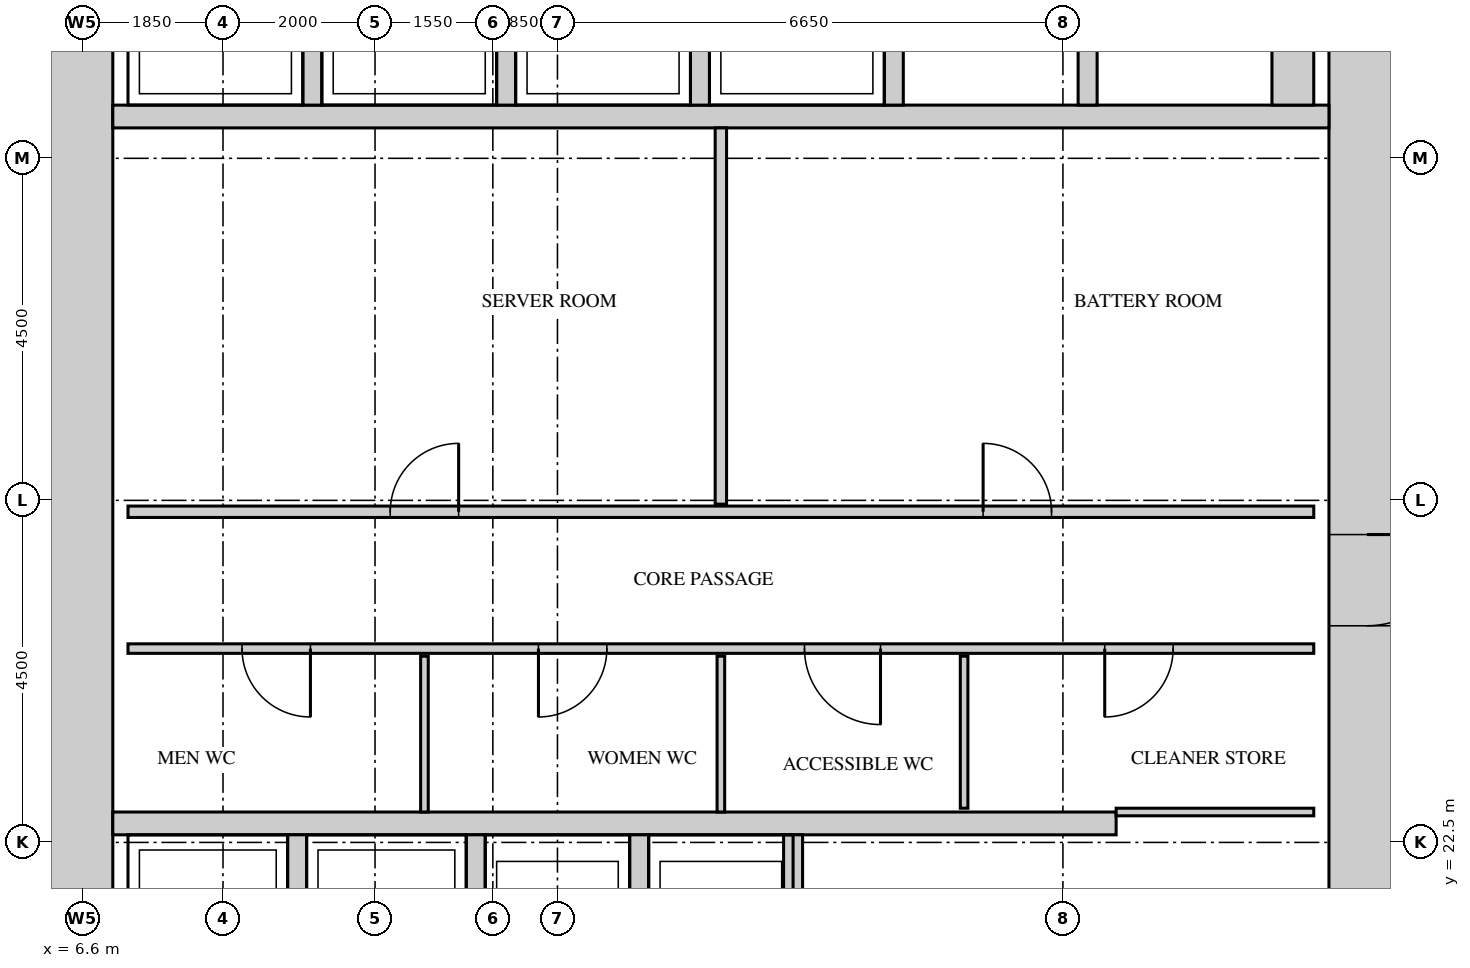
"""IFC4 building model, lengths in metres.
Left out: names, types, materials, properties, quantities, classifications, styles, units other than length and angle.
Written with IfcOpenShell. Run it as: python <this file> out.ifc"""

import sys

from ifc_helpers import new_model, si_unit, direction, frame, frame_2d, origin, place, context, subcontext, project, spatial, rectangle, extrude, source, transform, mapped, element, fill, save


model = new_model("IFC4")
c1 = context("Model", 3, precision=1e-05, world=origin(), true_north=direction((0.0, 1.0)))
c2 = subcontext(c1, "Body", "Model", "MODEL_VIEW")
j1 = project(units=[si_unit("LENGTHUNIT", "METRE"), si_unit("PLANEANGLEUNIT", "RADIAN")], contexts=[c1])
p1 = place(None, origin())
s1 = spatial("IfcSite", under=j1, at=p1, CompositionType="ELEMENT")
p2 = place(p1, origin())
s2 = spatial("IfcBuilding", under=s1, at=p2, CompositionType="ELEMENT")
p3 = place(p2, frame((0.0, 0.0, 141.1)))
s3 = spatial("IfcBuildingStorey", under=s2, at=p3, CompositionType="ELEMENT", Elevation=141.1)
m1 = source(origin(), c2, "Body", "SweptSolid", [
    extrude(rectangle(XDim=28.0, YDim=1.0, at=frame_2d((14.0, 0.0))), origin(), (0.0, 0.0, 1.0), 4.1),
])
p4 = place(p3, frame((23.5, 13.0, 0.0), z_axis=(0.0, 0.0, 1.0), x_axis=(0.0, 1.0, 0.0)))
e1 = element("IfcWall", 1, at=p4, inside=s3, PredefinedType="SHEAR", context=c2, shape_type="MappedRepresentation", body=[
    mapped(m1, transform((0.0, 0.0, 0.0))),
])
m2 = source(origin(), c2, "Body", "SweptSolid", [
    extrude(rectangle(XDim=1.8, YDim=2.1, at=frame_2d((0.9, 1.05))), frame((0.0, 0.51, 0.0), z_axis=(0.0, -1.0, 0.0), x_axis=(1.0, 0.0, 0.0)), (0.0, 0.0, 1.0), 1.02),
])
p5 = place(p4, frame((22.6, 0.0, 0.0)))
e2 = element("IfcOpeningElement", 2, at=p5, cuts=e1, PredefinedType="OPENING", context=c2, shape_type="MappedRepresentation", body=[
    mapped(m2, transform((0.0, 0.0, 0.0))),
])
m3 = source(origin(), c2, "Body", "SweptSolid", [
    extrude(rectangle(XDim=1.2, YDim=2.1, at=frame_2d((0.6, 1.05))), frame((0.0, 0.51, 0.0), z_axis=(0.0, -1.0, 0.0), x_axis=(1.0, 0.0, 0.0)), (0.0, 0.0, 1.0), 1.02),
])
p6 = place(p4, frame((12.35, 0.0, 0.0)))
e3 = element("IfcOpeningElement", 3, at=p6, cuts=e1, PredefinedType="OPENING", context=c2, shape_type="MappedRepresentation", body=[
    mapped(m3, transform((0.0, 0.0, 0.0))),
])
m4 = source(origin(), c2, "Body", "SweptSolid", [
    extrude(rectangle(XDim=0.9, YDim=2.1, at=frame_2d((0.45, 1.05))), frame((0.0, 0.51, 0.0), z_axis=(0.0, -1.0, 0.0), x_axis=(1.0, 0.0, 0.0)), (0.0, 0.0, 1.0), 1.02),
])
p7 = place(p4, frame((4.6, 0.0, 0.0)))
e4 = element("IfcOpeningElement", 4, at=p7, cuts=e1, PredefinedType="OPENING", context=c2, shape_type="MappedRepresentation", body=[
    mapped(m4, transform((0.0, 0.0, 0.0))),
])
p8 = place(p3, frame((6.5, 13.0, 0.0), z_axis=(0.0, 0.0, 1.0), x_axis=(0.0, 1.0, 0.0)))
e5 = element("IfcWall", 5, at=p8, inside=s3, PredefinedType="SHEAR", context=c2, shape_type="MappedRepresentation", body=[
    mapped(m1, transform((0.0, 0.0, 0.0))),
])
m5 = source(origin(), c2, "Body", "SweptSolid", [
    extrude(rectangle(XDim=13.2, YDim=0.3, at=frame_2d((6.6, 0.0))), origin(), (0.0, 0.0, 1.0), 4.1),
])
p9 = place(p3, frame((7.0, 22.75, 0.0), z_axis=(0.0, 0.0, 1.0), x_axis=(1.0, 0.0, 0.0)))
e6 = element("IfcWall", 6, at=p9, inside=s3, PredefinedType="STANDARD", context=c2, shape_type="MappedRepresentation", body=[
    mapped(m5, transform((0.0, 0.0, 0.0))),
])
m6 = source(origin(), c2, "Body", "SweptSolid", [
    extrude(rectangle(XDim=16.0, YDim=0.3, at=frame_2d((8.0, 0.0))), origin(), (0.0, 0.0, 1.0), 4.1),
])
p10 = place(p3, frame((7.0, 32.05, 0.0), z_axis=(0.0, 0.0, 1.0), x_axis=(1.0, 0.0, 0.0)))
e7 = element("IfcWall", 7, at=p10, inside=s3, PredefinedType="STANDARD", context=c2, shape_type="MappedRepresentation", body=[
    mapped(m6, transform((0.0, 0.0, 0.0))),
])
m7 = source(origin(), c2, "Body", "SweptSolid", [
    extrude(rectangle(XDim=3.1, YDim=0.25, at=frame_2d((1.55, 0.0))), origin(), (0.0, 0.0, 1.0), 4.1),
])
for number, where, z_axis, x_axis in (
    (8, (9.425, 19.5, 0.0), (0.0, 0.0, 1.0), (0.0, 1.0, 0.0)),
    (9, (11.775, 19.5, 0.0), (0.0, 0.0, 1.0), (0.0, 1.0, 0.0)),
    (10, (13.925, 19.5, 0.0), (0.0, 0.0, 1.0), (0.0, 1.0, 0.0)),
    (11, (15.95, 19.5, 0.0), (0.0, 0.0, 1.0), (0.0, 1.0, 0.0)),
):
    element("IfcWall", number, at=place(p3, frame(where, z_axis=z_axis, x_axis=x_axis)), inside=s3, PredefinedType="STANDARD", context=c2, shape_type="MappedRepresentation", body=[
        mapped(m7, transform((0.0, 0.0, 0.0))),
    ])
m8 = source(origin(), c2, "Body", "SweptSolid", [
    extrude(rectangle(XDim=2.4, YDim=0.25, at=frame_2d((1.2, 0.0))), origin(), (0.0, 0.0, 1.0), 4.1),
])
for number, where, z_axis, x_axis in (
    (12, (9.625, 32.2, 0.0), (0.0, 0.0, 1.0), (0.0, 1.0, 0.0)),
    (13, (12.175, 32.2, 0.0), (0.0, 0.0, 1.0), (0.0, 1.0, 0.0)),
    (14, (14.725, 32.2, 0.0), (0.0, 0.0, 1.0), (0.0, 1.0, 0.0)),
    (15, (17.275, 32.2, 0.0), (0.0, 0.0, 1.0), (0.0, 1.0, 0.0)),
    (16, (19.825, 32.2, 0.0), (0.0, 0.0, 1.0), (0.0, 1.0, 0.0)),
):
    element("IfcWall", number, at=place(p3, frame(where, z_axis=z_axis, x_axis=x_axis)), inside=s3, PredefinedType="STANDARD", context=c2, shape_type="MappedRepresentation", body=[
        mapped(m8, transform((0.0, 0.0, 0.0))),
    ])
m9 = source(origin(), c2, "Body", "SweptSolid", [
    extrude(rectangle(XDim=2.4, YDim=0.55, at=frame_2d((1.2, 0.0))), origin(), (0.0, 0.0, 1.0), 4.1),
])
p11 = place(p3, frame((22.525, 32.2, 0.0), z_axis=(0.0, 0.0, 1.0), x_axis=(0.0, 1.0, 0.0)))
e17 = element("IfcWall", 17, at=p11, inside=s3, PredefinedType="STANDARD", context=c2, shape_type="MappedRepresentation", body=[
    mapped(m9, transform((0.0, 0.0, 0.0))),
])
m10 = source(origin(), c2, "Body", "SweptSolid", [
    extrude(rectangle(XDim=2.05, YDim=0.1, at=frame_2d((1.025, 0.0))), origin(), (0.0, 0.0, 1.0), 4.2),
])
for number, where, z_axis, x_axis in (
    (18, (11.1, 22.9, 0.0), (0.0, 0.0, 1.0), (0.0, 1.0, 0.0)),
    (19, (15.0, 22.9, 0.0), (0.0, 0.0, 1.0), (0.0, 1.0, 0.0)),
):
    element("IfcWall", number, at=place(p3, frame(where, z_axis=z_axis, x_axis=x_axis)), inside=s3, PredefinedType="PARTITIONING", context=c2, shape_type="MappedRepresentation", body=[
        mapped(m10, transform((0.0, 0.0, 0.0))),
    ])
m11 = source(origin(), c2, "Body", "SweptSolid", [
    extrude(rectangle(XDim=2.6, YDim=0.1, at=frame_2d((1.3, 0.0))), origin(), (0.0, 0.0, 1.0), 4.2),
])
p12 = place(p3, frame((20.2, 22.9, 0.0), z_axis=(0.0, 0.0, 1.0), x_axis=(1.0, 0.0, 0.0)))
e20 = element("IfcWall", 20, at=p12, inside=s3, PredefinedType="PARTITIONING", context=c2, shape_type="MappedRepresentation", body=[
    mapped(m11, transform((0.0, 0.0, 0.0))),
])
m12 = source(origin(), c2, "Body", "SweptSolid", [
    extrude(rectangle(XDim=2.0, YDim=0.1, at=frame_2d((1.0, 0.0))), origin(), (0.0, 0.0, 1.0), 4.2),
])
p13 = place(p3, frame((18.2, 22.95, 0.0), z_axis=(0.0, 0.0, 1.0), x_axis=(0.0, 1.0, 0.0)))
e21 = element("IfcWall", 21, at=p13, inside=s3, PredefinedType="PARTITIONING", context=c2, shape_type="MappedRepresentation", body=[
    mapped(m12, transform((0.0, 0.0, 0.0))),
])
m13 = source(origin(), c2, "Body", "SweptSolid", [
    extrude(rectangle(XDim=15.6, YDim=0.125, at=frame_2d((7.8, 0.0))), origin(), (0.0, 0.0, 1.0), 4.2),
])
p14 = place(p3, frame((7.2, 25.05, 0.0), z_axis=(0.0, 0.0, 1.0), x_axis=(1.0, 0.0, 0.0)))
e22 = element("IfcWall", 22, at=p14, inside=s3, PredefinedType="PARTITIONING", context=c2, shape_type="MappedRepresentation", body=[
    mapped(m13, transform((0.0, 0.0, 0.0))),
])
m14 = source(origin(), c2, "Body", "SweptSolid", [
    extrude(rectangle(XDim=0.9, YDim=2.1, at=frame_2d((0.45, 1.05))), frame((0.0, 0.073, 0.0), z_axis=(0.0, -1.0, 0.0), x_axis=(1.0, 0.0, 0.0)), (0.0, 0.0, 1.0), 0.145),
])
p15 = place(p14, frame((1.5, 0.0, 0.0)))
e23 = element("IfcOpeningElement", 23, at=p15, cuts=e22, PredefinedType="OPENING", context=c2, shape_type="MappedRepresentation", body=[
    mapped(m14, transform((0.0, 0.0, 0.0))),
])
p16 = place(p14, frame((5.4, 0.0, 0.0)))
e24 = element("IfcOpeningElement", 24, at=p16, cuts=e22, PredefinedType="OPENING", context=c2, shape_type="MappedRepresentation", body=[
    mapped(m14, transform((0.0, 0.0, 0.0))),
])
m15 = source(origin(), c2, "Body", "SweptSolid", [
    extrude(rectangle(XDim=1.0, YDim=2.1, at=frame_2d((0.5, 1.05))), frame((0.0, 0.073, 0.0), z_axis=(0.0, -1.0, 0.0), x_axis=(1.0, 0.0, 0.0)), (0.0, 0.0, 1.0), 0.145),
])
p17 = place(p14, frame((8.9, 0.0, 0.0)))
e25 = element("IfcOpeningElement", 25, at=p17, cuts=e22, PredefinedType="OPENING", context=c2, shape_type="MappedRepresentation", body=[
    mapped(m15, transform((0.0, 0.0, 0.0))),
])
p18 = place(p14, frame((12.85, 0.0, 0.0)))
e26 = element("IfcOpeningElement", 26, at=p18, cuts=e22, PredefinedType="OPENING", context=c2, shape_type="MappedRepresentation", body=[
    mapped(m14, transform((0.0, 0.0, 0.0))),
])
m16 = source(origin(), c2, "Body", "SweptSolid", [
    extrude(rectangle(XDim=15.6, YDim=0.15, at=frame_2d((7.8, 0.0))), origin(), (0.0, 0.0, 1.0), 4.2),
])
p19 = place(p3, frame((7.2, 26.85, 0.0), z_axis=(0.0, 0.0, 1.0), x_axis=(1.0, 0.0, 0.0)))
e27 = element("IfcWall", 27, at=p19, inside=s3, PredefinedType="PARTITIONING", context=c2, shape_type="MappedRepresentation", body=[
    mapped(m16, transform((0.0, 0.0, 0.0))),
])
m17 = source(origin(), c2, "Body", "SweptSolid", [
    extrude(rectangle(XDim=0.9, YDim=2.1, at=frame_2d((0.45, 1.05))), frame((0.0, 0.085, 0.0), z_axis=(0.0, -1.0, 0.0), x_axis=(1.0, 0.0, 0.0)), (0.0, 0.0, 1.0), 0.17),
])
p20 = place(p19, frame((3.45, 0.0, 0.0)))
e28 = element("IfcOpeningElement", 28, at=p20, cuts=e27, PredefinedType="OPENING", context=c2, shape_type="MappedRepresentation", body=[
    mapped(m17, transform((0.0, 0.0, 0.0))),
])
p21 = place(p19, frame((11.25, 0.0, 0.0)))
e29 = element("IfcOpeningElement", 29, at=p21, cuts=e27, PredefinedType="OPENING", context=c2, shape_type="MappedRepresentation", body=[
    mapped(m17, transform((0.0, 0.0, 0.0))),
])
m18 = source(origin(), c2, "Body", "SweptSolid", [
    extrude(rectangle(XDim=4.95, YDim=0.15, at=frame_2d((2.475, 0.0))), origin(), (0.0, 0.0, 1.0), 4.2),
])
p22 = place(p3, frame((15.0, 26.95, 0.0), z_axis=(0.0, 0.0, 1.0), x_axis=(0.0, 1.0, 0.0)))
e30 = element("IfcWall", 30, at=p22, inside=s3, PredefinedType="PARTITIONING", context=c2, shape_type="MappedRepresentation", body=[
    mapped(m18, transform((0.0, 0.0, 0.0))),
])
m19 = source(origin(), c2, "Body", "SweptSolid", [
    extrude(rectangle(XDim=1.2, YDim=2.1, at=frame_2d((0.6, 1.05))), frame((0.0, 0.45, 0.0), z_axis=(0.0, -1.0, 0.0), x_axis=(1.0, 0.0, 0.0)), (0.0, 0.0, 1.0), 0.9),
])
p23 = place(p6, origin())
e31 = element("IfcDoor", 31, at=p23, inside=s3, OperationType="SINGLE_SWING_RIGHT", PredefinedType="DOOR", context=c2, shape_type="MappedRepresentation", body=[
    mapped(m19, transform((0.0, 0.0, 0.0))),
])
fill(e3, e31)
m20 = source(origin(), c2, "Body", "SweptSolid", [
    extrude(rectangle(XDim=0.9, YDim=2.1, at=frame_2d((0.45, 1.05))), frame((0.0, 0.025, 0.0), z_axis=(0.0, -1.0, 0.0), x_axis=(1.0, 0.0, 0.0)), (0.0, 0.0, 1.0), 0.05),
])
p24 = place(p20, origin())
e32 = element("IfcDoor", 32, at=p24, inside=s3, OperationType="SINGLE_SWING_LEFT", PredefinedType="DOOR", context=c2, shape_type="MappedRepresentation", body=[
    mapped(m20, transform((0.0, 0.0, 0.0))),
])
fill(e28, e32)
p25 = place(p21, origin())
e33 = element("IfcDoor", 33, at=p25, inside=s3, OperationType="SINGLE_SWING_RIGHT", PredefinedType="DOOR", context=c2, shape_type="MappedRepresentation", body=[
    mapped(m20, transform((0.0, 0.0, 0.0))),
])
fill(e29, e33)
p26 = place(p15, origin())
e34 = element("IfcDoor", 34, at=p26, inside=s3, OperationType="SINGLE_SWING_RIGHT", PredefinedType="DOOR", context=c2, shape_type="MappedRepresentation", body=[
    mapped(m20, transform((0.0, 0.0, 0.0))),
])
fill(e23, e34)
p27 = place(p16, origin())
e35 = element("IfcDoor", 35, at=p27, inside=s3, OperationType="SINGLE_SWING_LEFT", PredefinedType="DOOR", context=c2, shape_type="MappedRepresentation", body=[
    mapped(m20, transform((0.0, 0.0, 0.0))),
])
fill(e24, e35)
m21 = source(origin(), c2, "Body", "SweptSolid", [
    extrude(rectangle(XDim=1.0, YDim=2.1, at=frame_2d((0.5, 1.05))), frame((0.0, 0.025, 0.0), z_axis=(0.0, -1.0, 0.0), x_axis=(1.0, 0.0, 0.0)), (0.0, 0.0, 1.0), 0.05),
])
p28 = place(p17, origin())
e36 = element("IfcDoor", 36, at=p28, inside=s3, OperationType="SINGLE_SWING_RIGHT", PredefinedType="DOOR", context=c2, shape_type="MappedRepresentation", body=[
    mapped(m21, transform((0.0, 0.0, 0.0))),
])
fill(e25, e36)
p29 = place(p18, origin())
e37 = element("IfcDoor", 37, at=p29, inside=s3, OperationType="SINGLE_SWING_LEFT", PredefinedType="DOOR", context=c2, shape_type="MappedRepresentation", body=[
    mapped(m20, transform((0.0, 0.0, 0.0))),
])
fill(e26, e37)
save(model, sys.argv[1])
